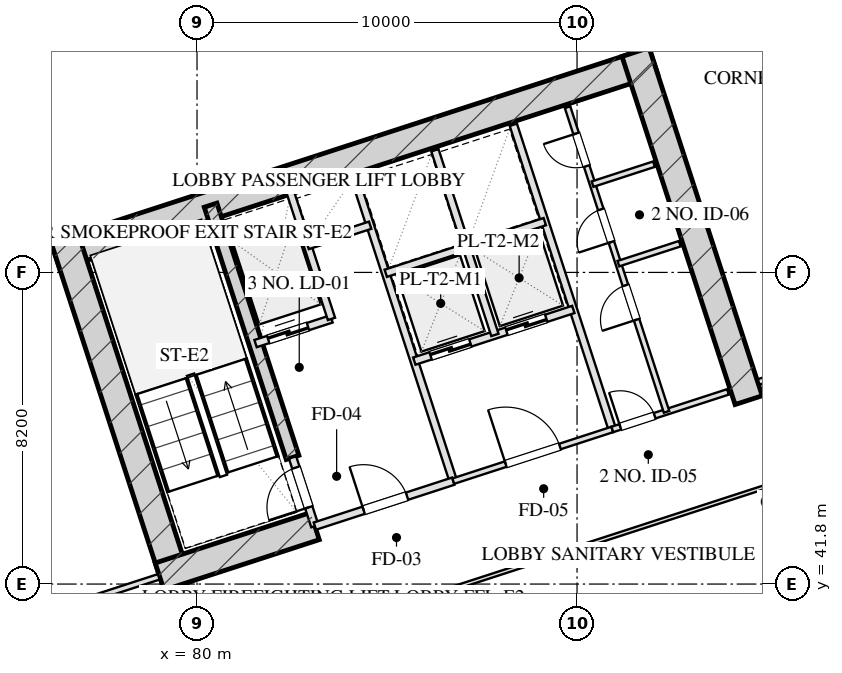
"""IFC4 building model, lengths in metres.
Left out: names, types, materials, properties, quantities, classifications, styles, units other than length and angle.
Written with IfcOpenShell. Run it as: python <this file> out.ifc"""

import sys

from ifc_helpers import new_model, si_unit, direction, frame, frame_2d, origin, place, context, subcontext, project, spatial, rectangle, extrude, element, fill, save


model = new_model("IFC4")
c1 = context("Model", 3, precision=1e-05, world=origin(), true_north=direction((0.0, 1.0)))
c2 = subcontext(c1, "Body", "Model", "MODEL_VIEW")
j1 = project(units=[si_unit("LENGTHUNIT", "METRE"), si_unit("PLANEANGLEUNIT", "RADIAN")], contexts=[c1])
p1 = place(None, origin())
s1 = spatial("IfcSite", under=j1, at=p1, CompositionType="ELEMENT")
p2 = place(p1, origin())
s2 = spatial("IfcBuilding", under=s1, at=p2, CompositionType="ELEMENT")
p3 = place(p2, frame((0.0, 0.0, 74.75)))
s3 = spatial("IfcBuildingStorey", under=s2, at=p3, CompositionType="ELEMENT", Elevation=74.75)
p4 = place(p3, frame((76.272, 50.443, 0.0), z_axis=(0.0, 0.0, 1.0), x_axis=(0.951056072937, 0.309018358888, 0.0)))
e1 = element("IfcWall", 1, at=p4, inside=s3, PredefinedType="SHEAR", context=c2, shape_type="SweptSolid", body=[
    extrude(rectangle(XDim=16.55, YDim=0.75, at=frame_2d((8.275, 0.0))), origin(), (0.0, 0.0, 1.0), 3.45),
])
for number, where, z_axis, x_axis in (
    (2, (79.489, 41.756, 0.0), (0.0, 0.0, 1.0), (-0.309, 0.951, 0.0)),
    (3, (94.515, 46.639, 0.0), (0.0, 0.0, 1.0), (-0.309, 0.951, 0.0)),
):
    element("IfcWall", number, at=place(p3, frame(where, z_axis=z_axis, x_axis=x_axis)), inside=s3, PredefinedType="SHEAR", context=c2, shape_type="SweptSolid", body=[
        extrude(rectangle(XDim=9.63, YDim=0.75, at=frame_2d((4.815, 0.0))), origin(), (0.0, 0.0, 1.0), 3.45),
    ])
p5 = place(p3, frame((82.514, 45.131, 0.0), z_axis=(0.0, 0.0, 1.0), x_axis=(-0.308988790936, 0.951065679686, 0.0)))
e4 = element("IfcWall", 4, at=p5, inside=s3, PredefinedType="SHEAR", context=c2, shape_type="SweptSolid", body=[
    extrude(rectangle(XDim=6.98, YDim=0.35, at=frame_2d((3.49, 0.0))), origin(), (0.0, 0.0, 1.0), 3.45),
])
p6 = place(p3, frame((79.016, 41.997, 0.0), z_axis=(0.0, 0.0, 1.0), x_axis=(0.95106038264, 0.309005094736, 0.0)))
e5 = element("IfcWall", 5, at=p6, inside=s3, PredefinedType="SHEAR", context=c2, shape_type="SweptSolid", body=[
    extrude(rectangle(XDim=4.295, YDim=0.75, at=frame_2d((2.147, 0.0))), origin(), (0.0, 0.0, 1.0), 3.45),
])
p7 = place(p3, frame((79.655, 4.352, 0.0), z_axis=(0.0, 0.0, 1.0), x_axis=(-0.309014526607, 0.951057318118, 0.0)))
e6 = element("IfcWall", 6, at=p7, inside=s3, PredefinedType="SOLIDWALL", context=c2, shape_type="SweptSolid", body=[
    extrude(rectangle(XDim=50.0, YDim=0.4, at=frame_2d((25.0, 0.0))), origin(), (0.0, 0.0, 1.0), 2.61),
])
p8 = place(p7, frame((17.35, 0.0, 0.75)))
e7 = element("IfcOpeningElement", 7, at=p8, cuts=e6, PredefinedType="OPENING", context=c2, shape_type="SweptSolid", body=[
    extrude(rectangle(XDim=2.5, YDim=1.46, at=frame_2d((1.25, 0.73))), frame((0.0, 0.21, 0.0), z_axis=(0.0, -1.0, 0.0), x_axis=(1.0, 0.0, 0.0)), (0.0, 0.0, 1.0), 0.42),
])
p9 = place(p7, frame((21.15, 0.0, 0.75)))
e8 = element("IfcOpeningElement", 8, at=p9, cuts=e6, PredefinedType="OPENING", context=c2, shape_type="SweptSolid", body=[
    extrude(rectangle(XDim=2.5, YDim=1.46, at=frame_2d((1.25, 0.73))), frame((0.0, 0.21, 0.0), z_axis=(0.0, -1.0, 0.0), x_axis=(1.0, 0.0, 0.0)), (0.0, 0.0, 1.0), 0.42),
])
p10 = place(p7, frame((26.35, 0.0, 0.75)))
e9 = element("IfcOpeningElement", 9, at=p10, cuts=e6, PredefinedType="OPENING", context=c2, shape_type="SweptSolid", body=[
    extrude(rectangle(XDim=2.5, YDim=1.46, at=frame_2d((1.25, 0.73))), frame((0.0, 0.21, 0.0), z_axis=(0.0, -1.0, 0.0), x_axis=(1.0, 0.0, 0.0)), (0.0, 0.0, 1.0), 0.42),
])
p11 = place(p7, frame((30.15, 0.0, 0.75)))
e10 = element("IfcOpeningElement", 10, at=p11, cuts=e6, PredefinedType="OPENING", context=c2, shape_type="SweptSolid", body=[
    extrude(rectangle(XDim=2.5, YDim=1.46, at=frame_2d((1.25, 0.73))), frame((0.0, 0.21, 0.0), z_axis=(0.0, -1.0, 0.0), x_axis=(1.0, 0.0, 0.0)), (0.0, 0.0, 1.0), 0.42),
])
p12 = place(p3, frame((66.002, 55.433, 0.0), z_axis=(0.0, 0.0, 1.0), x_axis=(0.951055939317, 0.309018770125, 0.0)))
e11 = element("IfcWall", 11, at=p12, inside=s3, PredefinedType="SOLIDWALL", context=c2, shape_type="SweptSolid", body=[
    extrude(rectangle(XDim=32.4, YDim=0.4, at=frame_2d((16.2, 0.0))), origin(), (0.0, 0.0, 1.0), 2.61),
])
p13 = place(p3, frame((83.101, 43.324, 0.0), z_axis=(0.0, 0.0, 1.0), x_axis=(-0.309048298632, 0.951046344356, 0.0)))
e12 = element("IfcWall", 12, at=p13, inside=s3, PredefinedType="PARTITIONING", context=c2, shape_type="SweptSolid", body=[
    extrude(rectangle(XDim=1.9, YDim=0.2, at=frame_2d((0.95, 0.0))), origin(), (0.0, 0.0, 1.0), 3.175),
])
p14 = place(p13, frame((0.52, 0.0, 0.0)))
e13 = element("IfcOpeningElement", 13, at=p14, cuts=e12, PredefinedType="OPENING", context=c2, shape_type="SweptSolid", body=[
    extrude(rectangle(XDim=1.1, YDim=2.05, at=frame_2d((0.55, 1.025))), frame((0.0, 0.11, 0.0), z_axis=(0.0, -1.0, 0.0), x_axis=(1.0, 0.0, 0.0)), (0.0, 0.0, 1.0), 0.22),
])
p15 = place(p3, frame((86.743, 44.508, 0.0), z_axis=(0.0, 0.0, 1.0), x_axis=(-0.309016001439, 0.951056838919, 0.0)))
e14 = element("IfcWall", 14, at=p15, inside=s3, PredefinedType="PARTITIONING", context=c2, shape_type="SweptSolid", body=[
    extrude(rectangle(XDim=8.43, YDim=0.2, at=frame_2d((4.215, 0.0))), origin(), (0.0, 0.0, 1.0), 3.175),
])
p16 = place(p3, frame((83.101, 43.324, 0.0), z_axis=(0.0, 0.0, 1.0), x_axis=(0.951052804469, 0.309028417967, 0.0)))
e15 = element("IfcWall", 15, at=p16, inside=s3, PredefinedType="PARTITIONING", context=c2, shape_type="SweptSolid", body=[
    extrude(rectangle(XDim=3.83, YDim=0.2, at=frame_2d((1.915, 0.0))), origin(), (0.0, 0.0, 1.0), 3.175),
])
p17 = place(p16, frame((1.35, 0.0, 0.0)))
e16 = element("IfcOpeningElement", 16, at=p17, cuts=e15, PredefinedType="OPENING", context=c2, shape_type="SweptSolid", body=[
    extrude(rectangle(XDim=1.2, YDim=2.05, at=frame_2d((0.6, 1.025))), frame((0.0, 0.11, 0.0), z_axis=(0.0, -1.0, 0.0), x_axis=(1.0, 0.0, 0.0)), (0.0, 0.0, 1.0), 0.22),
])
p18 = place(p3, frame((81.54, 48.127, 0.0), z_axis=(0.0, 0.0, 1.0), x_axis=(0.951062257173, 0.308999325213, 0.0)))
e17 = element("IfcWall", 17, at=p18, inside=s3, PredefinedType="PARTITIONING", context=c2, shape_type="SweptSolid", body=[
    extrude(rectangle(XDim=2.1, YDim=0.2, at=frame_2d((1.05, 0.0))), origin(), (0.0, 0.0, 1.0), 3.175),
])
p19 = place(p18, frame((0.35, 0.0, 0.0)))
e18 = element("IfcOpeningElement", 18, at=p19, cuts=e17, PredefinedType="OPENING", context=c2, shape_type="SweptSolid", body=[
    extrude(rectangle(XDim=1.1, YDim=2.05, at=frame_2d((0.55, 1.025))), frame((0.0, 0.11, 0.0), z_axis=(0.0, -1.0, 0.0), x_axis=(1.0, 0.0, 0.0)), (0.0, 0.0, 1.0), 0.22),
])
p20 = place(p3, frame((83.538, 48.776, 0.0), z_axis=(0.0, 0.0, 1.0), x_axis=(-0.3089935693, 0.951064127245, 0.0)))
e19 = element("IfcWall", 19, at=p20, inside=s3, PredefinedType="PARTITIONING", context=c2, shape_type="SweptSolid", body=[
    extrude(rectangle(XDim=3.7, YDim=0.2, at=frame_2d((1.85, 0.0))), origin(), (0.0, 0.0, 1.0), 3.175),
])
p21 = place(p3, frame((82.91, 50.707, 0.0), z_axis=(0.0, 0.0, 1.0), x_axis=(0.951041328149, 0.309063734775, 0.0)))
e20 = element("IfcWall", 20, at=p21, inside=s3, PredefinedType="PARTITIONING", context=c2, shape_type="SweptSolid", body=[
    extrude(rectangle(XDim=1.73, YDim=0.2, at=frame_2d((0.865, 0.0))), origin(), (0.0, 0.0, 1.0), 3.175),
])
p22 = place(p3, frame((90.928, 45.868, 0.0), z_axis=(0.0, 0.0, 1.0), x_axis=(-0.309042196757, 0.951048327176, 0.0)))
e21 = element("IfcWall", 21, at=p22, inside=s3, PredefinedType="PARTITIONING", context=c2, shape_type="SweptSolid", body=[
    extrude(rectangle(XDim=8.43, YDim=0.2, at=frame_2d((4.215, 0.0))), origin(), (0.0, 0.0, 1.0), 3.175),
])
p23 = place(p3, frame((86.743, 44.508, 0.0), z_axis=(0.0, 0.0, 1.0), x_axis=(0.951063829732, 0.308994485023, 0.0)))
e22 = element("IfcWall", 22, at=p23, inside=s3, PredefinedType="PARTITIONING", context=c2, shape_type="SweptSolid", body=[
    extrude(rectangle(XDim=4.4, YDim=0.15, at=frame_2d((2.2, 0.0))), origin(), (0.0, 0.0, 1.0), 3.175),
])
p24 = place(p23, frame((1.45, 0.0, 0.0)))
e23 = element("IfcOpeningElement", 23, at=p24, cuts=e22, PredefinedType="OPENING", context=c2, shape_type="SweptSolid", body=[
    extrude(rectangle(XDim=1.5, YDim=2.05, at=frame_2d((0.75, 1.025))), frame((0.0, 0.085, 0.0), z_axis=(0.0, -1.0, 0.0), x_axis=(1.0, 0.0, 0.0)), (0.0, 0.0, 1.0), 0.17),
])
p25 = place(p3, frame((85.718, 47.666, 0.0), z_axis=(0.0, 0.0, 1.0), x_axis=(0.951058531764, 0.30901079133, 0.0)))
e24 = element("IfcWall", 24, at=p25, inside=s3, PredefinedType="PARTITIONING", context=c2, shape_type="SweptSolid", body=[
    extrude(rectangle(XDim=4.4, YDim=0.2, at=frame_2d((2.2, 0.0))), origin(), (0.0, 0.0, 1.0), 3.175),
])
p26 = place(p25, frame((0.45, 0.0, 0.0)))
e25 = element("IfcOpeningElement", 25, at=p26, cuts=e24, PredefinedType="OPENING", context=c2, shape_type="SweptSolid", body=[
    extrude(rectangle(XDim=1.1, YDim=2.05, at=frame_2d((0.55, 1.025))), frame((0.0, 0.11, 0.0), z_axis=(0.0, -1.0, 0.0), x_axis=(1.0, 0.0, 0.0)), (0.0, 0.0, 1.0), 0.22),
])
p27 = place(p25, frame((2.55, 0.0, 0.0)))
e26 = element("IfcOpeningElement", 26, at=p27, cuts=e24, PredefinedType="OPENING", context=c2, shape_type="SweptSolid", body=[
    extrude(rectangle(XDim=1.1, YDim=2.05, at=frame_2d((0.55, 1.025))), frame((0.0, 0.11, 0.0), z_axis=(0.0, -1.0, 0.0), x_axis=(1.0, 0.0, 0.0)), (0.0, 0.0, 1.0), 0.22),
])
p28 = place(p3, frame((87.838, 48.354, 0.0), z_axis=(0.0, 0.0, 1.0), x_axis=(-0.3090093719, 0.951058992953, 0.0)))
e27 = element("IfcWall", 27, at=p28, inside=s3, PredefinedType="PARTITIONING", context=c2, shape_type="SweptSolid", body=[
    extrude(rectangle(XDim=5.11, YDim=0.2, at=frame_2d((2.555, 0.0))), origin(), (0.0, 0.0, 1.0), 3.175),
])
p29 = place(p3, frame((84.967, 49.977, 0.0), z_axis=(0.0, 0.0, 1.0), x_axis=(0.951063829732, 0.308994485023, 0.0)))
e28 = element("IfcWall", 28, at=p29, inside=s3, PredefinedType="PARTITIONING", context=c2, shape_type="SweptSolid", body=[
    extrude(rectangle(XDim=4.4, YDim=0.2, at=frame_2d((2.2, 0.0))), origin(), (0.0, 0.0, 1.0), 3.175),
])
p30 = place(p3, frame((90.928, 45.868, 0.0), z_axis=(0.0, 0.0, 1.0), x_axis=(0.951059297078, 0.309008435874, 0.0)))
e29 = element("IfcWall", 29, at=p30, inside=s3, PredefinedType="PARTITIONING", context=c2, shape_type="SweptSolid", body=[
    extrude(rectangle(XDim=3.2, YDim=0.15, at=frame_2d((1.6, 0.0))), origin(), (0.0, 0.0, 1.0), 3.175),
])
p31 = place(p30, frame((0.22, 0.0, 0.0)))
e30 = element("IfcOpeningElement", 30, at=p31, cuts=e29, PredefinedType="OPENING", context=c2, shape_type="SweptSolid", body=[
    extrude(rectangle(XDim=0.95, YDim=2.05, at=frame_2d((0.475, 1.025))), frame((0.0, 0.085, 0.0), z_axis=(0.0, -1.0, 0.0), x_axis=(1.0, 0.0, 0.0)), (0.0, 0.0, 1.0), 0.17),
])
p32 = place(p3, frame((92.355, 46.331, 0.0), z_axis=(0.0, 0.0, 1.0), x_axis=(-0.309007490203, 0.951059604335, 0.0)))
e31 = element("IfcWall", 31, at=p32, inside=s3, PredefinedType="PARTITIONING", context=c2, shape_type="SweptSolid", body=[
    extrude(rectangle(XDim=8.43, YDim=0.15, at=frame_2d((4.215, 0.0))), origin(), (0.0, 0.0, 1.0), 3.175),
])
p33 = place(p32, frame((2.55, 0.0, 0.0)))
e32 = element("IfcOpeningElement", 32, at=p33, cuts=e31, PredefinedType="OPENING", context=c2, shape_type="SweptSolid", body=[
    extrude(rectangle(XDim=0.95, YDim=2.05, at=frame_2d((0.475, 1.025))), frame((0.0, 0.085, 0.0), z_axis=(0.0, -1.0, 0.0), x_axis=(1.0, 0.0, 0.0)), (0.0, 0.0, 1.0), 0.17),
])
p34 = place(p32, frame((4.7, 0.0, 0.0)))
e33 = element("IfcOpeningElement", 33, at=p34, cuts=e31, PredefinedType="OPENING", context=c2, shape_type="SweptSolid", body=[
    extrude(rectangle(XDim=0.9, YDim=2.05, at=frame_2d((0.45, 1.025))), frame((0.0, 0.085, 0.0), z_axis=(0.0, -1.0, 0.0), x_axis=(1.0, 0.0, 0.0)), (0.0, 0.0, 1.0), 0.17),
])
p35 = place(p32, frame((6.8, 0.0, 0.0)))
e34 = element("IfcOpeningElement", 34, at=p35, cuts=e31, PredefinedType="OPENING", context=c2, shape_type="SweptSolid", body=[
    extrude(rectangle(XDim=0.9, YDim=2.05, at=frame_2d((0.45, 1.025))), frame((0.0, 0.085, 0.0), z_axis=(0.0, -1.0, 0.0), x_axis=(1.0, 0.0, 0.0)), (0.0, 0.0, 1.0), 0.17),
])
p36 = place(p3, frame((91.088, 50.23, 0.0), z_axis=(0.0, 0.0, 1.0), x_axis=(0.951054116971, 0.309024378638, 0.0)))
e35 = element("IfcWall", 35, at=p36, inside=s3, PredefinedType="PARTITIONING", context=c2, shape_type="SweptSolid", body=[
    extrude(rectangle(XDim=1.7, YDim=0.15, at=frame_2d((0.85, 0.0))), origin(), (0.0, 0.0, 1.0), 3.175),
])
p37 = place(p3, frame((90.408, 52.323, 0.0), z_axis=(0.0, 0.0, 1.0), x_axis=(0.951040401051, 0.309066587596, 0.0)))
e36 = element("IfcWall", 36, at=p37, inside=s3, PredefinedType="PARTITIONING", context=c2, shape_type="SweptSolid", body=[
    extrude(rectangle(XDim=1.7, YDim=0.15, at=frame_2d((0.85, 0.0))), origin(), (0.0, 0.0, 1.0), 3.175),
])
p38 = place(p3, frame((68.721, 38.652, 0.0), z_axis=(0.0, 0.0, 1.0), x_axis=(0.951056658866, 0.309016555588, 0.0)))
e37 = element("IfcWall", 37, at=p38, inside=s3, PredefinedType="PARTITIONING", context=c2, shape_type="SweptSolid", body=[
    extrude(rectangle(XDim=10.8, YDim=0.15, at=frame_2d((5.4, 0.0))), origin(), (0.0, 0.0, 1.0), 2.15),
])
p39 = place(p38, frame((4.536, 0.0, 0.0)))
e38 = element("IfcOpeningElement", 38, at=p39, cuts=e37, PredefinedType="OPENING", context=c2, shape_type="SweptSolid", body=[
    extrude(rectangle(XDim=1.0, YDim=2.05, at=frame_2d((0.5, 1.025))), frame((0.0, 0.085, 0.0), z_axis=(0.0, -1.0, 0.0), x_axis=(1.0, 0.0, 0.0)), (0.0, 0.0, 1.0), 0.17),
])
p40 = place(p3, frame((94.78, 47.119, 0.0), z_axis=(0.0, 0.0, 1.0), x_axis=(0.951054294345, 0.309023832749, 0.0)))
e39 = element("IfcWall", 39, at=p40, inside=s3, PredefinedType="PARTITIONING", context=c2, shape_type="SweptSolid", body=[
    extrude(rectangle(XDim=10.2, YDim=0.15, at=frame_2d((5.1, 0.0))), origin(), (0.0, 0.0, 1.0), 2.15),
])
p41 = place(p40, frame((4.284, 0.0, 0.0)))
e40 = element("IfcOpeningElement", 40, at=p41, cuts=e39, PredefinedType="OPENING", context=c2, shape_type="SweptSolid", body=[
    extrude(rectangle(XDim=1.0, YDim=2.05, at=frame_2d((0.5, 1.025))), frame((0.0, 0.085, 0.0), z_axis=(0.0, -1.0, 0.0), x_axis=(1.0, 0.0, 0.0)), (0.0, 0.0, 1.0), 0.17),
])
p42 = place(p3, frame((86.692, 41.673, 0.0), z_axis=(0.0, 0.0, 1.0), x_axis=(0.951055605195, 0.309019798438, 0.0)))
e41 = element("IfcWall", 41, at=p42, inside=s3, PredefinedType="MOVABLE", context=c2, shape_type="SweptSolid", body=[
    extrude(rectangle(XDim=19.575, YDim=0.1, at=frame_2d((9.788, 0.0))), origin(), (0.0, 0.0, 1.0), 3.175),
])
p43 = place(p3, frame((91.834, 25.848, 0.0), z_axis=(0.0, 0.0, 1.0), x_axis=(-0.30901773025, 0.951056277195, 0.0)))
e42 = element("IfcWall", 42, at=p43, inside=s3, PredefinedType="MOVABLE", context=c2, shape_type="SweptSolid", body=[
    extrude(rectangle(XDim=16.64, YDim=0.1, at=frame_2d((8.32, 0.0))), origin(), (0.0, 0.0, 1.0), 3.175),
])
p44 = place(p43, frame((1.16, 0.0, 0.0)))
e43 = element("IfcOpeningElement", 43, at=p44, cuts=e42, PredefinedType="OPENING", context=c2, shape_type="SweptSolid", body=[
    extrude(rectangle(XDim=1.05, YDim=2.05, at=frame_2d((0.525, 1.025))), frame((0.0, 0.06, 0.0), z_axis=(0.0, -1.0, 0.0), x_axis=(1.0, 0.0, 0.0)), (0.0, 0.0, 1.0), 0.12),
])
p45 = place(p43, frame((5.48, 0.0, 0.0)))
e44 = element("IfcOpeningElement", 44, at=p45, cuts=e42, PredefinedType="OPENING", context=c2, shape_type="SweptSolid", body=[
    extrude(rectangle(XDim=1.0, YDim=2.05, at=frame_2d((0.5, 1.025))), frame((0.0, 0.06, 0.0), z_axis=(0.0, -1.0, 0.0), x_axis=(1.0, 0.0, 0.0)), (0.0, 0.0, 1.0), 0.12),
])
p46 = place(p43, frame((8.08, 0.0, 0.0)))
e45 = element("IfcOpeningElement", 45, at=p46, cuts=e42, PredefinedType="OPENING", context=c2, shape_type="SweptSolid", body=[
    extrude(rectangle(XDim=0.85, YDim=2.05, at=frame_2d((0.425, 1.025))), frame((0.0, 0.06, 0.0), z_axis=(0.0, -1.0, 0.0), x_axis=(1.0, 0.0, 0.0)), (0.0, 0.0, 1.0), 0.12),
])
p47 = place(p43, frame((10.874, 0.0, 0.0)))
e46 = element("IfcOpeningElement", 46, at=p47, cuts=e42, PredefinedType="OPENING", context=c2, shape_type="SweptSolid", body=[
    extrude(rectangle(XDim=1.0, YDim=2.05, at=frame_2d((0.5, 1.025))), frame((0.0, 0.06, 0.0), z_axis=(0.0, -1.0, 0.0), x_axis=(1.0, 0.0, 0.0)), (0.0, 0.0, 1.0), 0.12),
])
p48 = place(p43, frame((14.174, 0.0, 0.0)))
e47 = element("IfcOpeningElement", 47, at=p48, cuts=e42, PredefinedType="OPENING", context=c2, shape_type="SweptSolid", body=[
    extrude(rectangle(XDim=1.0, YDim=2.05, at=frame_2d((0.5, 1.025))), frame((0.0, 0.06, 0.0), z_axis=(0.0, -1.0, 0.0), x_axis=(1.0, 0.0, 0.0)), (0.0, 0.0, 1.0), 0.12),
])
p49 = place(p3, frame((87.746, 38.429, 0.0), z_axis=(0.0, 0.0, 1.0), x_axis=(0.951055605195, 0.309019798438, 0.0)))
e48 = element("IfcWall", 48, at=p49, inside=s3, PredefinedType="MOVABLE", context=c2, shape_type="SweptSolid", body=[
    extrude(rectangle(XDim=19.575, YDim=0.1, at=frame_2d((9.788, 0.0))), origin(), (0.0, 0.0, 1.0), 3.175),
])
p50 = place(p14, origin())
e49 = element("IfcDoor", 49, at=p50, inside=s3, OperationType="SINGLE_SWING_LEFT", PredefinedType="DOOR", context=c2, shape_type="SweptSolid", body=[
    extrude(rectangle(XDim=1.1, YDim=2.05, at=frame_2d((0.55, 1.025))), frame((0.0, 0.025, 0.0), z_axis=(0.0, -1.0, 0.0), x_axis=(1.0, 0.0, 0.0)), (0.0, 0.0, 1.0), 0.05),
])
fill(e13, e49)
p51 = place(p17, origin())
e50 = element("IfcDoor", 50, at=p51, inside=s3, OperationType="SINGLE_SWING_LEFT", PredefinedType="DOOR", context=c2, shape_type="SweptSolid", body=[
    extrude(rectangle(XDim=1.2, YDim=2.05, at=frame_2d((0.6, 1.025))), frame((0.0, 0.025, 0.0), z_axis=(0.0, -1.0, 0.0), x_axis=(1.0, 0.0, 0.0)), (0.0, 0.0, 1.0), 0.05),
])
fill(e16, e50)
p52 = place(p19, origin())
e51 = element("IfcDoor", 51, at=p52, inside=s3, OperationType="DOUBLE_DOOR_SLIDING", PredefinedType="DOOR", context=c2, shape_type="SweptSolid", body=[
    extrude(rectangle(XDim=1.1, YDim=2.05, at=frame_2d((0.55, 1.025))), frame((0.0, 0.025, 0.0), z_axis=(0.0, -1.0, 0.0), x_axis=(1.0, 0.0, 0.0)), (0.0, 0.0, 1.0), 0.05),
])
fill(e18, e51)
p53 = place(p24, origin())
e52 = element("IfcDoor", 52, at=p53, inside=s3, OperationType="SINGLE_SWING_LEFT", PredefinedType="DOOR", context=c2, shape_type="SweptSolid", body=[
    extrude(rectangle(XDim=1.5, YDim=2.05, at=frame_2d((0.75, 1.025))), frame((0.0, 0.025, 0.0), z_axis=(0.0, -1.0, 0.0), x_axis=(1.0, 0.0, 0.0)), (0.0, 0.0, 1.0), 0.05),
])
fill(e23, e52)
p54 = place(p26, origin())
e53 = element("IfcDoor", 53, at=p54, inside=s3, OperationType="DOUBLE_DOOR_SLIDING", PredefinedType="DOOR", context=c2, shape_type="SweptSolid", body=[
    extrude(rectangle(XDim=1.1, YDim=2.05, at=frame_2d((0.55, 1.025))), frame((0.0, 0.025, 0.0), z_axis=(0.0, -1.0, 0.0), x_axis=(1.0, 0.0, 0.0)), (0.0, 0.0, 1.0), 0.05),
])
fill(e25, e53)
p55 = place(p27, origin())
e54 = element("IfcDoor", 54, at=p55, inside=s3, OperationType="DOUBLE_DOOR_SLIDING", PredefinedType="DOOR", context=c2, shape_type="SweptSolid", body=[
    extrude(rectangle(XDim=1.1, YDim=2.05, at=frame_2d((0.55, 1.025))), frame((0.0, 0.025, 0.0), z_axis=(0.0, -1.0, 0.0), x_axis=(1.0, 0.0, 0.0)), (0.0, 0.0, 1.0), 0.05),
])
fill(e26, e54)
p56 = place(p31, origin())
e55 = element("IfcDoor", 55, at=p56, inside=s3, OperationType="SINGLE_SWING_LEFT", PredefinedType="DOOR", context=c2, shape_type="SweptSolid", body=[
    extrude(rectangle(XDim=0.95, YDim=2.05, at=frame_2d((0.475, 1.025))), frame((0.0, 0.025, 0.0), z_axis=(0.0, -1.0, 0.0), x_axis=(1.0, 0.0, 0.0)), (0.0, 0.0, 1.0), 0.05),
])
fill(e30, e55)
p57 = place(p33, origin())
e56 = element("IfcDoor", 56, at=p57, inside=s3, OperationType="SINGLE_SWING_LEFT", PredefinedType="DOOR", context=c2, shape_type="SweptSolid", body=[
    extrude(rectangle(XDim=0.95, YDim=2.05, at=frame_2d((0.475, 1.025))), frame((0.0, 0.025, 0.0), z_axis=(0.0, -1.0, 0.0), x_axis=(1.0, 0.0, 0.0)), (0.0, 0.0, 1.0), 0.05),
])
fill(e32, e56)
p58 = place(p34, origin())
e57 = element("IfcDoor", 57, at=p58, inside=s3, OperationType="SINGLE_SWING_LEFT", PredefinedType="DOOR", context=c2, shape_type="SweptSolid", body=[
    extrude(rectangle(XDim=0.9, YDim=2.05, at=frame_2d((0.45, 1.025))), frame((0.0, 0.025, 0.0), z_axis=(0.0, -1.0, 0.0), x_axis=(1.0, 0.0, 0.0)), (0.0, 0.0, 1.0), 0.05),
])
fill(e33, e57)
p59 = place(p35, origin())
e58 = element("IfcDoor", 58, at=p59, inside=s3, OperationType="SINGLE_SWING_RIGHT", PredefinedType="DOOR", context=c2, shape_type="SweptSolid", body=[
    extrude(rectangle(XDim=0.9, YDim=2.05, at=frame_2d((0.45, 1.025))), frame((0.0, 0.025, 0.0), z_axis=(0.0, -1.0, 0.0), x_axis=(1.0, 0.0, 0.0)), (0.0, 0.0, 1.0), 0.05),
])
fill(e34, e58)
save(model, sys.argv[1])
